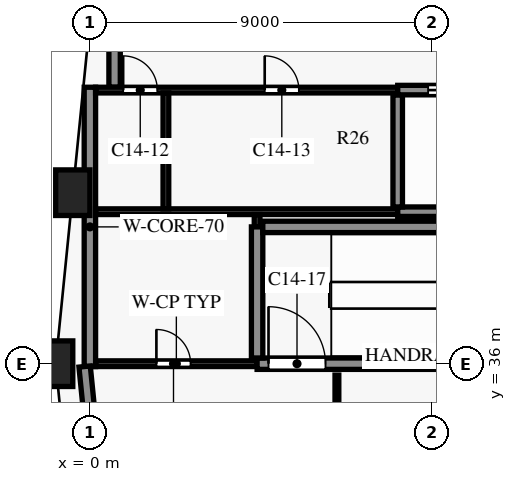
"""IFC4 building model, lengths in metres.
Left out: names, types, materials, properties, quantities, classifications, styles, units other than length and angle.
Written with IfcOpenShell. Run it as: python <this file> out.ifc"""

import sys

from ifc_helpers import new_model, si_unit, direction, frame, frame_2d, origin, origin_2d, place, context, subcontext, project, spatial, rectangle, extrude, element, fill, save


model = new_model("IFC4")
c1 = context("Model", 3, precision=1e-05, world=origin(), true_north=direction((0.0, 1.0)))
c2 = subcontext(c1, "Body", "Model", "MODEL_VIEW")
j1 = project(units=[si_unit("LENGTHUNIT", "METRE"), si_unit("PLANEANGLEUNIT", "RADIAN")], contexts=[c1])
p1 = place(None, origin())
s1 = spatial("IfcSite", under=j1, at=p1, CompositionType="ELEMENT")
p2 = place(p1, origin())
s2 = spatial("IfcBuilding", under=s1, at=p2, CompositionType="ELEMENT")
p3 = place(p2, frame((0.0, 0.0, 96.1)))
s3 = spatial("IfcBuildingStorey", under=s2, at=p3, CompositionType="ELEMENT", Elevation=96.1)
for number, where, z_axis, x_axis in (
    (1, (-0.45, 40.5, 0.0), (0.0, 0.0, 1.0), (-0.1, -0.995, 0.0)),
    (2, (-0.9, 36.0, 0.0), (0.0, 0.0, 1.0), (0.0, -1.0, 0.0)),
):
    element("IfcColumn", number, at=place(p3, frame(where, z_axis=z_axis, x_axis=x_axis)), inside=s3, PredefinedType="COLUMN", context=c2, shape_type="SweptSolid", body=[
        extrude(rectangle(XDim=0.9, YDim=1.2, at=origin_2d()), origin(), (0.0, 0.0, 1.0), 3.8),
    ])
p4 = place(p3, frame((0.755, 26.985, 0.0), z_axis=(0.0, 0.0, 1.0), x_axis=(-0.099479505633, 0.995039611251, 0.0)))
e3 = element("IfcWall", 3, at=p4, inside=s3, PredefinedType="SOLIDWALL", context=c2, shape_type="SweptSolid", body=[
    extrude(rectangle(XDim=8.985, YDim=0.3, at=frame_2d((4.492, 0.0))), origin(), (0.0, 0.0, 1.0), 3.15),
])
p5 = place(p4, frame((0.701, 0.0, 0.15)))
e4 = element("IfcOpeningElement", 4, at=p5, cuts=e3, PredefinedType="OPENING", context=c2, shape_type="SweptSolid", body=[
    extrude(rectangle(XDim=3.3, YDim=2.4, at=frame_2d((1.65, 1.2))), frame((0.0, 0.16, 0.0), z_axis=(0.0, -1.0, 0.0), x_axis=(1.0, 0.0, 0.0)), (0.0, 0.0, 1.0), 0.32),
])
p6 = place(p4, frame((5.974, 0.0, 0.75)))
e5 = element("IfcOpeningElement", 5, at=p6, cuts=e3, PredefinedType="OPENING", context=c2, shape_type="SweptSolid", body=[
    extrude(rectangle(XDim=1.8, YDim=1.8, at=frame_2d((0.9, 0.9))), frame((0.0, 0.16, 0.0), z_axis=(0.0, -1.0, 0.0), x_axis=(1.0, 0.0, 0.0)), (0.0, 0.0, 1.0), 0.32),
])
p7 = place(p3, frame((0.15, 36.0, 0.0), z_axis=(0.0, 0.0, 1.0), x_axis=(1.0, 0.0, 0.0)))
e6 = element("IfcWall", 6, at=p7, inside=s3, PredefinedType="PARTITIONING", context=c2, shape_type="SweptSolid", body=[
    extrude(rectangle(XDim=4.25, YDim=0.15, at=frame_2d((2.125, 0.0))), origin(), (0.0, 0.0, 1.0), 3.5),
])
p8 = place(p7, frame((1.6, 0.0, 0.0)))
e7 = element("IfcOpeningElement", 7, at=p8, cuts=e6, PredefinedType="OPENING", context=c2, shape_type="SweptSolid", body=[
    extrude(rectangle(XDim=0.9, YDim=2.1, at=frame_2d((0.45, 1.05))), frame((0.0, 0.085, 0.0), z_axis=(0.0, -1.0, 0.0), x_axis=(1.0, 0.0, 0.0)), (0.0, 0.0, 1.0), 0.17),
])
p9 = place(p3, frame((4.4, 36.0, 0.0), z_axis=(0.0, 0.0, 1.0), x_axis=(1.0, 0.0, 0.0)))
e8 = element("IfcWall", 8, at=p9, inside=s3, PredefinedType="SHEAR", context=c2, shape_type="SweptSolid", body=[
    extrude(rectangle(XDim=8.0, YDim=0.3, at=frame_2d((4.0, 0.0))), origin(), (0.0, 0.0, 1.0), 3.5),
])
p10 = place(p9, frame((0.3, 0.0, 0.0)))
e9 = element("IfcOpeningElement", 9, at=p10, cuts=e8, PredefinedType="OPENING", context=c2, shape_type="SweptSolid", body=[
    extrude(rectangle(XDim=1.5, YDim=2.2, at=frame_2d((0.75, 1.1))), frame((0.0, 0.16, 0.0), z_axis=(0.0, -1.0, 0.0), x_axis=(1.0, 0.0, 0.0)), (0.0, 0.0, 1.0), 0.32),
])
p11 = place(p3, frame((4.55, 39.6, 0.0), z_axis=(0.0, 0.0, 1.0), x_axis=(1.0, 0.0, 0.0)))
e10 = element("IfcWall", 10, at=p11, inside=s3, PredefinedType="SHEAR", context=c2, shape_type="SweptSolid", body=[
    extrude(rectangle(XDim=7.7, YDim=0.3, at=frame_2d((3.85, 0.0))), origin(), (0.0, 0.0, 1.0), 3.5),
])
p12 = place(p3, frame((0.15, 40.0, 0.0), z_axis=(0.0, 0.0, 1.0), x_axis=(1.0, 0.0, 0.0)))
e11 = element("IfcWall", 11, at=p12, inside=s3, PredefinedType="PARTITIONING", context=c2, shape_type="SweptSolid", body=[
    extrude(rectangle(XDim=7.95, YDim=0.15, at=frame_2d((3.975, 0.0))), origin(), (0.0, 0.0, 1.0), 3.5),
])
p13 = place(p3, frame((8.1, 40.0, 0.0), z_axis=(0.0, 0.0, 1.0), x_axis=(1.0, 0.0, 0.0)))
e12 = element("IfcWall", 12, at=p13, inside=s3, PredefinedType="SHEAR", context=c2, shape_type="SweptSolid", body=[
    extrude(rectangle(XDim=13.5, YDim=0.25, at=frame_2d((6.75, 0.0))), origin(), (0.0, 0.0, 1.0), 3.5),
])
p14 = place(p3, frame((0.15, 43.2, 0.0), z_axis=(0.0, 0.0, 1.0), x_axis=(1.0, 0.0, 0.0)))
e13 = element("IfcWall", 13, at=p14, inside=s3, PredefinedType="PARTITIONING", context=c2, shape_type="SweptSolid", body=[
    extrude(rectangle(XDim=7.95, YDim=0.15, at=frame_2d((3.975, 0.0))), origin(), (0.0, 0.0, 1.0), 3.5),
])
p15 = place(p14, frame((0.725, 0.0, 0.0)))
e14 = element("IfcOpeningElement", 14, at=p15, cuts=e13, PredefinedType="OPENING", context=c2, shape_type="SweptSolid", body=[
    extrude(rectangle(XDim=0.9, YDim=2.1, at=frame_2d((0.45, 1.05))), frame((0.0, 0.085, 0.0), z_axis=(0.0, -1.0, 0.0), x_axis=(1.0, 0.0, 0.0)), (0.0, 0.0, 1.0), 0.17),
])
p16 = place(p14, frame((4.45, 0.0, 0.0)))
e15 = element("IfcOpeningElement", 15, at=p16, cuts=e13, PredefinedType="OPENING", context=c2, shape_type="SweptSolid", body=[
    extrude(rectangle(XDim=0.9, YDim=2.1, at=frame_2d((0.45, 1.05))), frame((0.0, 0.085, 0.0), z_axis=(0.0, -1.0, 0.0), x_axis=(1.0, 0.0, 0.0)), (0.0, 0.0, 1.0), 0.17),
])
p17 = place(p3, frame((8.1, 43.2, 0.0), z_axis=(0.0, 0.0, 1.0), x_axis=(1.0, 0.0, 0.0)))
e16 = element("IfcWall", 16, at=p17, inside=s3, PredefinedType="SHEAR", context=c2, shape_type="SweptSolid", body=[
    extrude(rectangle(XDim=13.5, YDim=0.25, at=frame_2d((6.75, 0.0))), origin(), (0.0, 0.0, 1.0), 3.5),
])
p18 = place(p17, frame((0.8, 0.0, 0.0)))
e17 = element("IfcOpeningElement", 17, at=p18, cuts=e16, PredefinedType="OPENING", context=c2, shape_type="SweptSolid", body=[
    extrude(rectangle(XDim=1.1, YDim=2.1, at=frame_2d((0.55, 1.05))), frame((0.0, 0.135, 0.0), z_axis=(0.0, -1.0, 0.0), x_axis=(1.0, 0.0, 0.0)), (0.0, 0.0, 1.0), 0.27),
])
p19 = place(p17, frame((3.5, 0.0, 0.0)))
e18 = element("IfcOpeningElement", 18, at=p19, cuts=e16, PredefinedType="OPENING", context=c2, shape_type="SweptSolid", body=[
    extrude(rectangle(XDim=1.1, YDim=2.1, at=frame_2d((0.55, 1.05))), frame((0.0, 0.135, 0.0), z_axis=(0.0, -1.0, 0.0), x_axis=(1.0, 0.0, 0.0)), (0.0, 0.0, 1.0), 0.27),
])
p20 = place(p17, frame((6.2, 0.0, 0.0)))
e19 = element("IfcOpeningElement", 19, at=p20, cuts=e16, PredefinedType="OPENING", context=c2, shape_type="SweptSolid", body=[
    extrude(rectangle(XDim=1.1, YDim=2.1, at=frame_2d((0.55, 1.05))), frame((0.0, 0.135, 0.0), z_axis=(0.0, -1.0, 0.0), x_axis=(1.0, 0.0, 0.0)), (0.0, 0.0, 1.0), 0.27),
])
p21 = place(p17, frame((8.9, 0.0, 0.0)))
e20 = element("IfcOpeningElement", 20, at=p21, cuts=e16, PredefinedType="OPENING", context=c2, shape_type="SweptSolid", body=[
    extrude(rectangle(XDim=1.1, YDim=2.1, at=frame_2d((0.55, 1.05))), frame((0.0, 0.135, 0.0), z_axis=(0.0, -1.0, 0.0), x_axis=(1.0, 0.0, 0.0)), (0.0, 0.0, 1.0), 0.27),
])
p22 = place(p17, frame((11.6, 0.0, 0.0)))
e21 = element("IfcOpeningElement", 21, at=p22, cuts=e16, PredefinedType="OPENING", context=c2, shape_type="SweptSolid", body=[
    extrude(rectangle(XDim=1.1, YDim=2.1, at=frame_2d((0.55, 1.05))), frame((0.0, 0.135, 0.0), z_axis=(0.0, -1.0, 0.0), x_axis=(1.0, 0.0, 0.0)), (0.0, 0.0, 1.0), 0.27),
])
p23 = place(p3, frame((0.0, 35.925, 0.0), z_axis=(0.0, 0.0, 1.0), x_axis=(0.0, 1.0, 0.0)))
e22 = element("IfcWall", 22, at=p23, inside=s3, PredefinedType="SHEAR", context=c2, shape_type="SweptSolid", body=[
    extrude(rectangle(XDim=7.35, YDim=0.3, at=frame_2d((3.675, 0.0))), origin(), (0.0, 0.0, 1.0), 3.5),
])
p24 = place(p3, frame((0.65, 43.275, 0.0), z_axis=(0.0, 0.0, 1.0), x_axis=(0.0, 1.0, 0.0)))
e23 = element("IfcWall", 23, at=p24, inside=s3, PredefinedType="SHEAR", context=c2, shape_type="SweptSolid", body=[
    extrude(rectangle(XDim=3.65, YDim=0.3, at=frame_2d((1.825, 0.0))), origin(), (0.0, 0.0, 1.0), 3.5),
])
p25 = place(p3, frame((2.0, 40.075, 0.0), z_axis=(0.0, 0.0, 1.0), x_axis=(0.0, 1.0, 0.0)))
e24 = element("IfcWall", 24, at=p25, inside=s3, PredefinedType="PARTITIONING", context=c2, shape_type="SweptSolid", body=[
    extrude(rectangle(XDim=3.05, YDim=0.15, at=frame_2d((1.525, 0.0))), origin(), (0.0, 0.0, 1.0), 3.5),
])
p26 = place(p3, frame((4.4, 39.6, 0.0), z_axis=(0.0, 0.0, 1.0), x_axis=(0.0, 1.0, 0.0)))
e25 = element("IfcWall", 25, at=p26, inside=s3, PredefinedType="PARTITIONING", context=c2, shape_type="SweptSolid", body=[
    extrude(rectangle(XDim=0.325, YDim=0.15, at=frame_2d((0.163, 0.0))), origin(), (0.0, 0.0, 1.0), 3.5),
])
p27 = place(p3, frame((4.4, 36.15, 0.0), z_axis=(0.0, 0.0, 1.0), x_axis=(0.0, 1.0, 0.0)))
e26 = element("IfcWall", 26, at=p27, inside=s3, PredefinedType="SHEAR", context=c2, shape_type="SweptSolid", body=[
    extrude(rectangle(XDim=3.45, YDim=0.3, at=frame_2d((1.725, 0.0))), origin(), (0.0, 0.0, 1.0), 3.5),
])
p28 = place(p3, frame((8.1, 40.125, 0.0), z_axis=(0.0, 0.0, 1.0), x_axis=(0.0, 1.0, 0.0)))
e27 = element("IfcWall", 27, at=p28, inside=s3, PredefinedType="SHEAR", context=c2, shape_type="SweptSolid", body=[
    extrude(rectangle(XDim=2.95, YDim=0.25, at=frame_2d((1.475, 0.0))), origin(), (0.0, 0.0, 1.0), 3.5),
])
p29 = place(p3, frame((6.5, 33.55, 0.0), z_axis=(0.0, 0.0, 1.0), x_axis=(0.0, 1.0, 0.0)))
e28 = element("IfcWall", 28, at=p29, inside=s3, PredefinedType="PARTITIONING", context=c2, shape_type="SweptSolid", body=[
    extrude(rectangle(XDim=2.15, YDim=0.1, at=frame_2d((1.075, 0.0))), origin(), (0.0, 0.0, 1.0), 3.48),
])
p30 = place(p8, origin())
e29 = element("IfcDoor", 29, at=p30, inside=s3, OperationType="SINGLE_SWING_LEFT", PredefinedType="DOOR", context=c2, shape_type="SweptSolid", body=[
    extrude(rectangle(XDim=0.9, YDim=2.1, at=frame_2d((0.45, 1.05))), frame((0.0, 0.025, 0.0), z_axis=(0.0, -1.0, 0.0), x_axis=(1.0, 0.0, 0.0)), (0.0, 0.0, 1.0), 0.05),
])
fill(e7, e29)
p31 = place(p15, origin())
e30 = element("IfcDoor", 30, at=p31, inside=s3, OperationType="SINGLE_SWING_LEFT", PredefinedType="DOOR", context=c2, shape_type="SweptSolid", body=[
    extrude(rectangle(XDim=0.9, YDim=2.1, at=frame_2d((0.45, 1.05))), frame((0.0, 0.025, 0.0), z_axis=(0.0, -1.0, 0.0), x_axis=(1.0, 0.0, 0.0)), (0.0, 0.0, 1.0), 0.05),
])
fill(e14, e30)
p32 = place(p16, origin())
e31 = element("IfcDoor", 31, at=p32, inside=s3, OperationType="SINGLE_SWING_RIGHT", PredefinedType="DOOR", context=c2, shape_type="SweptSolid", body=[
    extrude(rectangle(XDim=0.9, YDim=2.1, at=frame_2d((0.45, 1.05))), frame((0.0, 0.025, 0.0), z_axis=(0.0, -1.0, 0.0), x_axis=(1.0, 0.0, 0.0)), (0.0, 0.0, 1.0), 0.05),
])
fill(e15, e31)
p33 = place(p10, origin())
e32 = element("IfcDoor", 32, at=p33, inside=s3, OperationType="SINGLE_SWING_RIGHT", PredefinedType="DOOR", context=c2, shape_type="SweptSolid", body=[
    extrude(rectangle(XDim=1.5, YDim=2.2, at=frame_2d((0.75, 1.1))), frame((0.0, 0.025, 0.0), z_axis=(0.0, -1.0, 0.0), x_axis=(1.0, 0.0, 0.0)), (0.0, 0.0, 1.0), 0.05),
])
fill(e9, e32)
p34 = place(p18, origin())
e33 = element("IfcDoor", 33, at=p34, inside=s3, OperationType="DOUBLE_DOOR_SLIDING", PredefinedType="DOOR", context=c2, shape_type="SweptSolid", body=[
    extrude(rectangle(XDim=1.1, YDim=2.1, at=frame_2d((0.55, 1.05))), frame((0.0, 0.025, 0.0), z_axis=(0.0, -1.0, 0.0), x_axis=(1.0, 0.0, 0.0)), (0.0, 0.0, 1.0), 0.05),
])
fill(e17, e33)
save(model, sys.argv[1])
